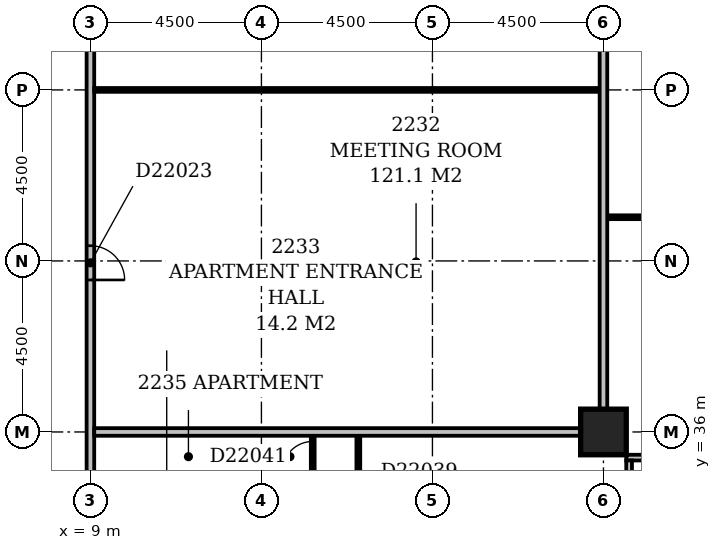
"""IFC4 building model, lengths in metres.
Left out: names, types, materials, properties, quantities, classifications, styles, units other than length and angle.
Written with IfcOpenShell. Run it as: python <this file> out.ifc"""

import sys

from ifc_helpers import new_model, si_unit, direction, frame, frame_2d, origin, origin_2d, place, context, subcontext, project, spatial, rectangle, extrude, element, fill, save


model = new_model("IFC4")
c1 = context("Model", 3, precision=1e-05, world=origin(), true_north=direction((0.0, 1.0)))
c2 = subcontext(c1, "Body", "Model", "MODEL_VIEW")
j1 = project(units=[si_unit("LENGTHUNIT", "METRE"), si_unit("PLANEANGLEUNIT", "RADIAN")], contexts=[c1])
p1 = place(None, origin())
s1 = spatial("IfcSite", under=j1, at=p1, CompositionType="ELEMENT")
p2 = place(p1, origin())
s2 = spatial("IfcBuilding", under=s1, at=p2, CompositionType="ELEMENT")
p3 = place(p2, frame((0.0, 0.0, 90.2)))
s3 = spatial("IfcBuildingStorey", under=s2, at=p3, CompositionType="ELEMENT", Elevation=90.2)
p4 = place(p3, frame((22.5, 36.0, -0.3), z_axis=(0.0, 0.0, 1.0), x_axis=(1.0, 0.0, 0.0)))
e1 = element("IfcColumn", 1, at=p4, inside=s3, PredefinedType="COLUMN", context=c2, shape_type="SweptSolid", body=[
    extrude(rectangle(XDim=1.2, YDim=1.2, at=origin_2d()), origin(), (0.0, 0.0, 1.0), 3.6),
])
p5 = place(p3, frame((23.175, 17.4, 0.0), z_axis=(0.0, 0.0, 1.0), x_axis=(0.0, 1.0, 0.0)))
e2 = element("IfcWall", 2, at=p5, inside=s3, PredefinedType="STANDARD", context=c2, shape_type="SweptSolid", body=[
    extrude(rectangle(XDim=17.85, YDim=0.15, at=frame_2d((8.925, 0.0))), origin(), (0.0, 0.0, 1.0), 2.7),
])
p6 = place(p5, frame((3.0, 0.0, 0.6)))
e3 = element("IfcOpeningElement", 3, at=p6, cuts=e2, PredefinedType="OPENING", context=c2, shape_type="SweptSolid", body=[
    extrude(rectangle(XDim=1.2, YDim=1.8, at=frame_2d((0.6, 0.9))), frame((0.0, 0.087, 0.0), z_axis=(0.0, -1.0, 0.0), x_axis=(1.0, 0.0, 0.0)), (0.0, 0.0, 1.0), 0.174),
])
p7 = place(p5, frame((6.15, 0.0, 0.6)))
e4 = element("IfcOpeningElement", 4, at=p7, cuts=e2, PredefinedType="OPENING", context=c2, shape_type="SweptSolid", body=[
    extrude(rectangle(XDim=2.4, YDim=1.8, at=frame_2d((1.2, 0.9))), frame((0.0, 0.087, 0.0), z_axis=(0.0, -1.0, 0.0), x_axis=(1.0, 0.0, 0.0)), (0.0, 0.0, 1.0), 0.174),
])
p8 = place(p5, frame((10.65, 0.0, 0.6)))
e5 = element("IfcOpeningElement", 5, at=p8, cuts=e2, PredefinedType="OPENING", context=c2, shape_type="SweptSolid", body=[
    extrude(rectangle(XDim=2.4, YDim=1.8, at=frame_2d((1.2, 0.9))), frame((0.0, 0.087, 0.0), z_axis=(0.0, -1.0, 0.0), x_axis=(1.0, 0.0, 0.0)), (0.0, 0.0, 1.0), 0.174),
])
p9 = place(p5, frame((15.15, 0.0, 0.6)))
e6 = element("IfcOpeningElement", 6, at=p9, cuts=e2, PredefinedType="OPENING", context=c2, shape_type="SweptSolid", body=[
    extrude(rectangle(XDim=2.4, YDim=1.8, at=frame_2d((1.2, 0.9))), frame((0.0, 0.087, 0.0), z_axis=(0.0, -1.0, 0.0), x_axis=(1.0, 0.0, 0.0)), (0.0, 0.0, 1.0), 0.174),
])
p10 = place(p3, frame((23.1, 35.325, 0.0), z_axis=(0.0, 0.0, 1.0), x_axis=(1.0, 0.0, 0.0)))
e7 = element("IfcWall", 7, at=p10, inside=s3, PredefinedType="STANDARD", context=c2, shape_type="SweptSolid", body=[
    extrude(rectangle(XDim=45.15, YDim=0.15, at=frame_2d((22.575, 0.0))), origin(), (0.0, 0.0, 1.0), 2.7),
])
p11 = place(p10, frame((2.185, 0.0, 0.6)))
e8 = element("IfcOpeningElement", 8, at=p11, cuts=e7, PredefinedType="OPENING", context=c2, shape_type="SweptSolid", body=[
    extrude(rectangle(XDim=0.9, YDim=1.8, at=frame_2d((0.45, 0.9))), frame((0.0, 0.087, 0.0), z_axis=(0.0, -1.0, 0.0), x_axis=(1.0, 0.0, 0.0)), (0.0, 0.0, 1.0), 0.174),
])
p12 = place(p10, frame((4.95, 0.0, 0.6)))
e9 = element("IfcOpeningElement", 9, at=p12, cuts=e7, PredefinedType="OPENING", context=c2, shape_type="SweptSolid", body=[
    extrude(rectangle(XDim=2.4, YDim=1.8, at=frame_2d((1.2, 0.9))), frame((0.0, 0.087, 0.0), z_axis=(0.0, -1.0, 0.0), x_axis=(1.0, 0.0, 0.0)), (0.0, 0.0, 1.0), 0.174),
])
p13 = place(p10, frame((9.45, 0.0, 0.6)))
e10 = element("IfcOpeningElement", 10, at=p13, cuts=e7, PredefinedType="OPENING", context=c2, shape_type="SweptSolid", body=[
    extrude(rectangle(XDim=2.4, YDim=1.8, at=frame_2d((1.2, 0.9))), frame((0.0, 0.087, 0.0), z_axis=(0.0, -1.0, 0.0), x_axis=(1.0, 0.0, 0.0)), (0.0, 0.0, 1.0), 0.174),
])
p14 = place(p10, frame((13.95, 0.0, 0.6)))
e11 = element("IfcOpeningElement", 11, at=p14, cuts=e7, PredefinedType="OPENING", context=c2, shape_type="SweptSolid", body=[
    extrude(rectangle(XDim=2.4, YDim=1.8, at=frame_2d((1.2, 0.9))), frame((0.0, 0.087, 0.0), z_axis=(0.0, -1.0, 0.0), x_axis=(1.0, 0.0, 0.0)), (0.0, 0.0, 1.0), 0.174),
])
p15 = place(p10, frame((18.45, 0.0, 0.6)))
e12 = element("IfcOpeningElement", 12, at=p15, cuts=e7, PredefinedType="OPENING", context=c2, shape_type="SweptSolid", body=[
    extrude(rectangle(XDim=2.4, YDim=1.8, at=frame_2d((1.2, 0.9))), frame((0.0, 0.087, 0.0), z_axis=(0.0, -1.0, 0.0), x_axis=(1.0, 0.0, 0.0)), (0.0, 0.0, 1.0), 0.174),
])
p16 = place(p10, frame((22.71, 0.0, 0.6)))
e13 = element("IfcOpeningElement", 13, at=p16, cuts=e7, PredefinedType="OPENING", context=c2, shape_type="SweptSolid", body=[
    extrude(rectangle(XDim=1.8, YDim=1.8, at=frame_2d((0.9, 0.9))), frame((0.0, 0.087, 0.0), z_axis=(0.0, -1.0, 0.0), x_axis=(1.0, 0.0, 0.0)), (0.0, 0.0, 1.0), 0.174),
])
p17 = place(p10, frame((28.861, 0.0, 0.6)))
e14 = element("IfcOpeningElement", 14, at=p17, cuts=e7, PredefinedType="OPENING", context=c2, shape_type="SweptSolid", body=[
    extrude(rectangle(XDim=1.2, YDim=1.8, at=frame_2d((0.6, 0.9))), frame((0.0, 0.087, 0.0), z_axis=(0.0, -1.0, 0.0), x_axis=(1.0, 0.0, 0.0)), (0.0, 0.0, 1.0), 0.174),
])
p18 = place(p10, frame((31.95, 0.0, 0.6)))
e15 = element("IfcOpeningElement", 15, at=p18, cuts=e7, PredefinedType="OPENING", context=c2, shape_type="SweptSolid", body=[
    extrude(rectangle(XDim=2.4, YDim=1.8, at=frame_2d((1.2, 0.9))), frame((0.0, 0.087, 0.0), z_axis=(0.0, -1.0, 0.0), x_axis=(1.0, 0.0, 0.0)), (0.0, 0.0, 1.0), 0.174),
])
p19 = place(p10, frame((36.45, 0.0, 0.6)))
e16 = element("IfcOpeningElement", 16, at=p19, cuts=e7, PredefinedType="OPENING", context=c2, shape_type="SweptSolid", body=[
    extrude(rectangle(XDim=2.4, YDim=1.8, at=frame_2d((1.2, 0.9))), frame((0.0, 0.087, 0.0), z_axis=(0.0, -1.0, 0.0), x_axis=(1.0, 0.0, 0.0)), (0.0, 0.0, 1.0), 0.174),
])
p20 = place(p10, frame((40.95, 0.0, 0.6)))
e17 = element("IfcOpeningElement", 17, at=p20, cuts=e7, PredefinedType="OPENING", context=c2, shape_type="SweptSolid", body=[
    extrude(rectangle(XDim=2.4, YDim=1.8, at=frame_2d((1.2, 0.9))), frame((0.0, 0.087, 0.0), z_axis=(0.0, -1.0, 0.0), x_axis=(1.0, 0.0, 0.0)), (0.0, 0.0, 1.0), 0.174),
])
p21 = place(p3, frame((9.0, 5.0, 0.0), z_axis=(0.0, 0.0, 1.0), x_axis=(0.0, 1.0, 0.0)))
e18 = element("IfcWall", 18, at=p21, inside=s3, PredefinedType="PARTITIONING", context=c2, shape_type="SweptSolid", body=[
    extrude(rectangle(XDim=44.5, YDim=0.2, at=frame_2d((22.25, 0.0))), origin(), (0.0, 0.0, 1.0), 3.3),
])
p22 = place(p21, frame((28.45, 0.0, 0.0)))
e19 = element("IfcOpeningElement", 19, at=p22, cuts=e18, PredefinedType="OPENING", context=c2, shape_type="SweptSolid", body=[
    extrude(rectangle(XDim=1.0, YDim=2.1, at=frame_2d((0.5, 1.05))), frame((0.0, 0.112, 0.0), z_axis=(0.0, -1.0, 0.0), x_axis=(1.0, 0.0, 0.0)), (0.0, 0.0, 1.0), 0.224),
])
p23 = place(p21, frame((22.8, 0.0, 0.0)))
e20 = element("IfcOpeningElement", 20, at=p23, cuts=e18, PredefinedType="OPENING", context=c2, shape_type="SweptSolid", body=[
    extrude(rectangle(XDim=1.0, YDim=2.1, at=frame_2d((0.5, 1.05))), frame((0.0, 0.112, 0.0), z_axis=(0.0, -1.0, 0.0), x_axis=(1.0, 0.0, 0.0)), (0.0, 0.0, 1.0), 0.224),
])
p24 = place(p21, frame((14.55, 0.0, 0.0)))
e21 = element("IfcOpeningElement", 21, at=p24, cuts=e18, PredefinedType="OPENING", context=c2, shape_type="SweptSolid", body=[
    extrude(rectangle(XDim=1.0, YDim=2.1, at=frame_2d((0.5, 1.05))), frame((0.0, 0.112, 0.0), z_axis=(0.0, -1.0, 0.0), x_axis=(1.0, 0.0, 0.0)), (0.0, 0.0, 1.0), 0.224),
])
p25 = place(p21, frame((9.3, 0.0, 0.0)))
e22 = element("IfcOpeningElement", 22, at=p25, cuts=e18, PredefinedType="OPENING", context=c2, shape_type="SweptSolid", body=[
    extrude(rectangle(XDim=1.0, YDim=2.1, at=frame_2d((0.5, 1.05))), frame((0.0, 0.112, 0.0), z_axis=(0.0, -1.0, 0.0), x_axis=(1.0, 0.0, 0.0)), (0.0, 0.0, 1.0), 0.224),
])
p26 = place(p21, frame((35.0, 0.0, 0.0)))
e23 = element("IfcOpeningElement", 23, at=p26, cuts=e18, PredefinedType="OPENING", context=c2, shape_type="SweptSolid", body=[
    extrude(rectangle(XDim=0.9, YDim=2.1, at=frame_2d((0.45, 1.05))), frame((0.0, 0.112, 0.0), z_axis=(0.0, -1.0, 0.0), x_axis=(1.0, 0.0, 0.0)), (0.0, 0.0, 1.0), 0.224),
])
p27 = place(p21, frame((1.5, 0.0, 0.0)))
e24 = element("IfcOpeningElement", 24, at=p27, cuts=e18, PredefinedType="OPENING", context=c2, shape_type="SweptSolid", body=[
    extrude(rectangle(XDim=0.9, YDim=2.1, at=frame_2d((0.45, 1.05))), frame((0.0, 0.112, 0.0), z_axis=(0.0, -1.0, 0.0), x_axis=(1.0, 0.0, 0.0)), (0.0, 0.0, 1.0), 0.224),
])
p28 = place(p3, frame((16.05, 31.6, 0.0), z_axis=(0.0, 0.0, 1.0), x_axis=(0.0, 1.0, 0.0)))
e25 = element("IfcWall", 25, at=p28, inside=s3, PredefinedType="PARTITIONING", context=c2, shape_type="SweptSolid", body=[
    extrude(rectangle(XDim=4.3, YDim=0.1, at=frame_2d((2.15, 0.0))), origin(), (0.0, 0.0, 1.0), 3.3),
])
p29 = place(p28, frame((1.7, 0.0, 0.0)))
e26 = element("IfcOpeningElement", 26, at=p29, cuts=e25, PredefinedType="OPENING", context=c2, shape_type="SweptSolid", body=[
    extrude(rectangle(XDim=0.9, YDim=2.1, at=frame_2d((0.45, 1.05))), frame((0.0, 0.062, 0.0), z_axis=(0.0, -1.0, 0.0), x_axis=(1.0, 0.0, 0.0)), (0.0, 0.0, 1.0), 0.124),
])
p30 = place(p3, frame((14.85, 34.7, 0.0), z_axis=(0.0, 0.0, 1.0), x_axis=(0.0, 1.0, 0.0)))
e27 = element("IfcWall", 27, at=p30, inside=s3, PredefinedType="PARTITIONING", context=c2, shape_type="SweptSolid", body=[
    extrude(rectangle(XDim=1.2, YDim=0.1, at=frame_2d((0.6, 0.0))), origin(), (0.0, 0.0, 1.0), 3.3),
])
p31 = place(p30, frame((0.25, 0.0, 0.0)))
e28 = element("IfcOpeningElement", 28, at=p31, cuts=e27, PredefinedType="OPENING", context=c2, shape_type="SweptSolid", body=[
    extrude(rectangle(XDim=0.8, YDim=2.1, at=frame_2d((0.4, 1.05))), frame((0.0, 0.062, 0.0), z_axis=(0.0, -1.0, 0.0), x_axis=(1.0, 0.0, 0.0)), (0.0, 0.0, 1.0), 0.124),
])
p32 = place(p3, frame((9.1, 36.0, 0.0), z_axis=(0.0, 0.0, 1.0), x_axis=(1.0, 0.0, 0.0)))
e29 = element("IfcWall", 29, at=p32, inside=s3, PredefinedType="PARTITIONING", context=c2, shape_type="SweptSolid", body=[
    extrude(rectangle(XDim=12.8, YDim=0.2, at=frame_2d((6.4, 0.0))), origin(), (0.0, 0.0, 1.0), 2.4),
])
p33 = place(p3, frame((22.5, 36.6, 0.0), z_axis=(0.0, 0.0, 1.0), x_axis=(0.0, 1.0, 0.0)))
e30 = element("IfcWall", 30, at=p33, inside=s3, PredefinedType="PARTITIONING", context=c2, shape_type="SweptSolid", body=[
    extrude(rectangle(XDim=12.8, YDim=0.2, at=frame_2d((6.4, 0.0))), origin(), (0.0, 0.0, 1.0), 3.3),
])
p34 = place(p3, frame((22.6, 41.65, 0.0), z_axis=(0.0, 0.0, 1.0), x_axis=(1.0, 0.0, 0.0)))
e31 = element("IfcWall", 31, at=p34, inside=s3, PredefinedType="PARTITIONING", context=c2, shape_type="SweptSolid", body=[
    extrude(rectangle(XDim=8.8, YDim=0.1, at=frame_2d((4.4, 0.0))), origin(), (0.0, 0.0, 1.0), 3.3),
])
p35 = place(p34, frame((1.7, 0.0, 0.0)))
e32 = element("IfcOpeningElement", 32, at=p35, cuts=e31, PredefinedType="OPENING", context=c2, shape_type="SweptSolid", body=[
    extrude(rectangle(XDim=0.9, YDim=2.1, at=frame_2d((0.45, 1.05))), frame((0.0, 0.062, 0.0), z_axis=(0.0, -1.0, 0.0), x_axis=(1.0, 0.0, 0.0)), (0.0, 0.0, 1.0), 0.124),
])
p36 = place(p34, frame((6.2, 0.0, 0.0)))
e33 = element("IfcOpeningElement", 33, at=p36, cuts=e31, PredefinedType="OPENING", context=c2, shape_type="SweptSolid", body=[
    extrude(rectangle(XDim=0.9, YDim=2.1, at=frame_2d((0.45, 1.05))), frame((0.0, 0.062, 0.0), z_axis=(0.0, -1.0, 0.0), x_axis=(1.0, 0.0, 0.0)), (0.0, 0.0, 1.0), 0.124),
])
p37 = place(p3, frame((9.1, 45.0, 0.0), z_axis=(0.0, 0.0, 1.0), x_axis=(1.0, 0.0, 0.0)))
e34 = element("IfcWall", 34, at=p37, inside=s3, PredefinedType="PARTITIONING", context=c2, shape_type="SweptSolid", body=[
    extrude(rectangle(XDim=13.3, YDim=0.1, at=frame_2d((6.65, 0.0))), origin(), (0.0, 0.0, 1.0), 3.3),
])
p38 = place(p26, frame((0.9, 0.0, 0.0), z_axis=(0.0, 0.0, 1.0), x_axis=(-1.0, 0.0, 0.0)))
e35 = element("IfcDoor", 35, at=p38, inside=s3, OperationType="SINGLE_SWING_RIGHT", PredefinedType="DOOR", context=c2, shape_type="SweptSolid", body=[
    extrude(rectangle(XDim=0.9, YDim=2.1, at=frame_2d((0.45, 1.05))), frame((0.0, 0.025, 0.0), z_axis=(0.0, -1.0, 0.0), x_axis=(1.0, 0.0, 0.0)), (0.0, 0.0, 1.0), 0.05),
])
fill(e23, e35)
p39 = place(p31, origin())
e36 = element("IfcDoor", 36, at=p39, inside=s3, OperationType="SINGLE_SWING_LEFT", PredefinedType="DOOR", context=c2, shape_type="SweptSolid", body=[
    extrude(rectangle(XDim=0.8, YDim=2.1, at=frame_2d((0.4, 1.05))), frame((0.0, 0.025, 0.0), z_axis=(0.0, -1.0, 0.0), x_axis=(1.0, 0.0, 0.0)), (0.0, 0.0, 1.0), 0.05),
])
fill(e28, e36)
save(model, sys.argv[1])
